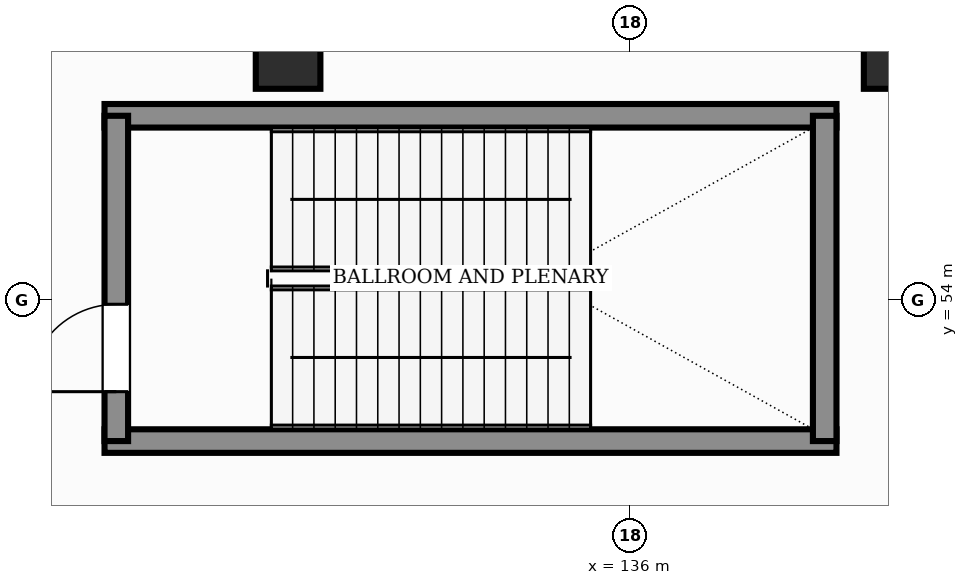
"""IFC4 building model, lengths in metres.
Left out: names, types, materials, properties, quantities, classifications, styles, units other than length and angle.
Written with IfcOpenShell. Run it as: python <this file> out.ifc"""

import sys

from ifc_helpers import new_model, si_unit, direction, frame, frame_2d, origin, origin_2d, place, context, subcontext, project, spatial, rectangle, extrude, element, fill, save


model = new_model("IFC4")
c1 = context("Model", 3, precision=1e-05, world=origin(), true_north=direction((0.0, 1.0)))
c2 = subcontext(c1, "Body", "Model", "MODEL_VIEW")
j1 = project(units=[si_unit("LENGTHUNIT", "METRE"), si_unit("PLANEANGLEUNIT", "RADIAN")], contexts=[c1])
p1 = place(None, origin())
s1 = spatial("IfcSite", under=j1, at=p1, CompositionType="ELEMENT")
p2 = place(p1, origin())
s2 = spatial("IfcBuilding", under=s1, at=p2, CompositionType="ELEMENT")
p3 = place(p2, origin())
s3 = spatial("IfcBuildingStorey", under=s2, at=p3, CompositionType="ELEMENT", Elevation=0.0)
for number, where, z_axis, x_axis in (
    (1, (131.5, 57.2, 0.0), (0.0, 0.0, 1.0), (1.0, 0.0, 0.0)),
    (2, (139.5, 57.2, 0.0), (0.0, 0.0, 1.0), (1.0, 0.0, 0.0)),
):
    element("IfcColumn", number, at=place(p3, frame(where, z_axis=z_axis, x_axis=x_axis)), inside=s3, PredefinedType="COLUMN", context=c2, shape_type="SweptSolid", body=[
        extrude(rectangle(XDim=0.85, YDim=0.85, at=origin_2d()), origin(), (0.0, 0.0, 1.0), 6.0),
    ])
for number, where, z_axis, x_axis in (
    (3, (129.085, 52.14, 0.0), (0.0, 0.0, 1.0), (1.0, 0.0, 0.0)),
    (4, (129.085, 56.42, 0.0), (0.0, 0.0, 1.0), (1.0, 0.0, 0.0)),
):
    element("IfcWall", number, at=place(p3, frame(where, z_axis=z_axis, x_axis=x_axis)), inside=s3, PredefinedType="SHEAR", context=c2, shape_type="SweptSolid", body=[
        extrude(rectangle(XDim=9.63, YDim=0.31, at=frame_2d((4.815, 0.0))), origin(), (0.0, 0.0, 1.0), 6.0),
    ])
p4 = place(p3, frame((129.24, 52.14, 0.0), z_axis=(0.0, 0.0, 1.0), x_axis=(0.0, 1.0, 0.0)))
e5 = element("IfcWall", 5, at=p4, inside=s3, PredefinedType="SHEAR", context=c2, shape_type="SweptSolid", body=[
    extrude(rectangle(XDim=4.28, YDim=0.31, at=frame_2d((2.14, 0.0))), origin(), (0.0, 0.0, 1.0), 6.0),
])
p5 = place(p4, frame((0.65, 0.0, 0.0)))
e6 = element("IfcOpeningElement", 6, at=p5, cuts=e5, PredefinedType="OPENING", context=c2, shape_type="SweptSolid", body=[
    extrude(rectangle(XDim=1.15, YDim=2.2, at=frame_2d((0.575, 1.1))), frame((0.0, 0.165, 0.0), z_axis=(0.0, -1.0, 0.0), x_axis=(1.0, 0.0, 0.0)), (0.0, 0.0, 1.0), 0.33),
])
p6 = place(p3, frame((138.56, 52.14, 0.0), z_axis=(0.0, 0.0, 1.0), x_axis=(0.0, 1.0, 0.0)))
e7 = element("IfcWall", 7, at=p6, inside=s3, PredefinedType="SHEAR", context=c2, shape_type="SweptSolid", body=[
    extrude(rectangle(XDim=4.28, YDim=0.31, at=frame_2d((2.14, 0.0))), origin(), (0.0, 0.0, 1.0), 6.0),
])
p7 = place(p5, origin())
e8 = element("IfcDoor", 8, at=p7, inside=s3, OperationType="SINGLE_SWING_LEFT", PredefinedType="DOOR", context=c2, shape_type="SweptSolid", body=[
    extrude(rectangle(XDim=1.15, YDim=2.2, at=frame_2d((0.575, 1.1))), frame((0.0, 0.025, 0.0), z_axis=(0.0, -1.0, 0.0), x_axis=(1.0, 0.0, 0.0)), (0.0, 0.0, 1.0), 0.05),
])
fill(e6, e8)
save(model, sys.argv[1])
